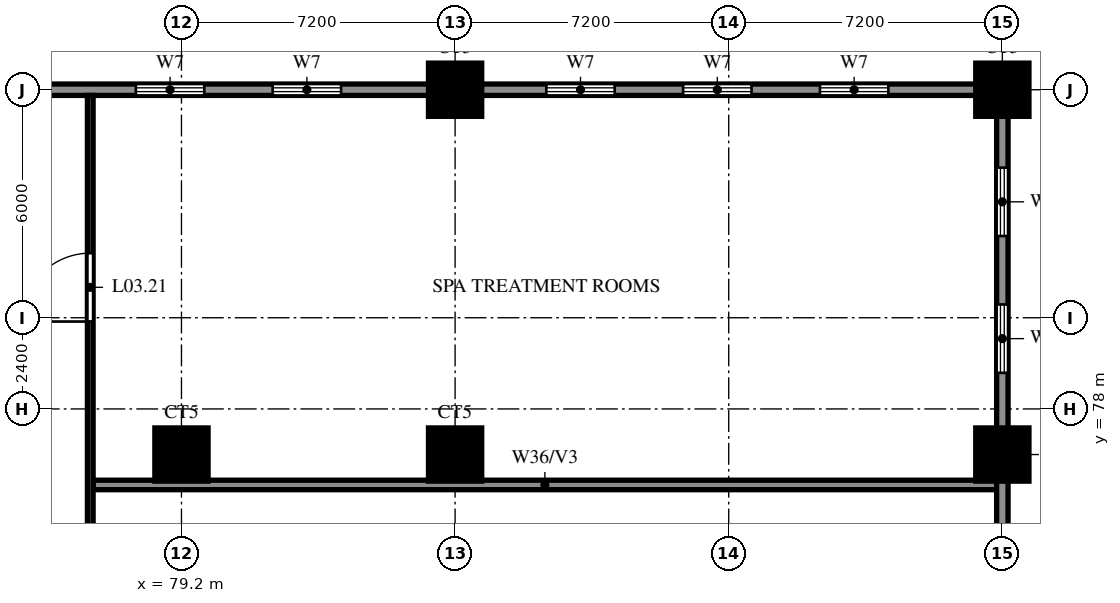
"""IFC4 building model, lengths in metres.
Left out: names, types, materials, properties, quantities, classifications, styles, units other than length and angle.
Written with IfcOpenShell. Run it as: python <this file> out.ifc"""

import sys

from ifc_helpers import new_model, si_unit, direction, frame, frame_2d, origin, origin_2d, place, context, subcontext, project, spatial, rectangle, circle, extrude, source, transform, mapped, element, fill, save


model = new_model("IFC4")
c1 = context("Model", 3, precision=1e-05, world=origin(), true_north=direction((0.0, 1.0)))
c2 = subcontext(c1, "Body", "Model", "MODEL_VIEW")
j1 = project(units=[si_unit("LENGTHUNIT", "METRE"), si_unit("PLANEANGLEUNIT", "RADIAN")], contexts=[c1])
p1 = place(None, origin())
s1 = spatial("IfcSite", under=j1, at=p1, CompositionType="ELEMENT")
p2 = place(p1, origin())
s2 = spatial("IfcBuilding", under=s1, at=p2, CompositionType="ELEMENT")
p3 = place(p2, frame((0.0, 0.0, 17.4)))
s3 = spatial("IfcBuildingStorey", under=s2, at=p3, CompositionType="ELEMENT", Elevation=17.4)
m1 = source(origin(), c2, "Body", "SweptSolid", [
    extrude(circle(Radius=0.7, at=origin_2d()), origin(), (0.0, 0.0, 1.0), 3.8),
])
for number, where, z_axis, x_axis in (
    (1, (79.2, 76.8, 0.0), (0.0, 0.0, 1.0), (1.0, 0.0, 0.0)),
    (2, (86.4, 76.8, 0.0), (0.0, 0.0, 1.0), (1.0, 0.0, 0.0)),
    (3, (100.8, 76.8, 0.0), (0.0, 0.0, 1.0), (1.0, 0.0, 0.0)),
    (4, (86.4, 86.4, 0.0), (0.0, 0.0, 1.0), (1.0, 0.0, 0.0)),
    (5, (100.8, 86.4, 0.0), (0.0, 0.0, 1.0), (1.0, 0.0, 0.0)),
):
    element("IfcColumn", number, at=place(p3, frame(where, z_axis=z_axis, x_axis=x_axis)), inside=s3, PredefinedType="COLUMN", context=c2, shape_type="MappedRepresentation", body=[
        mapped(m1, transform((0.0, 0.0, 0.0))),
    ])
p4 = place(p3, frame((76.875, 76.0, 0.0), z_axis=(0.0, 0.0, 1.0), x_axis=(1.0, 0.0, 0.0)))
e6 = element("IfcWall", 6, at=p4, inside=s3, PredefinedType="SOLIDWALL", context=c2, shape_type="SweptSolid", body=[
    extrude(rectangle(XDim=23.775, YDim=0.25, at=frame_2d((11.887, 0.0))), origin(), (0.0, 0.0, 1.0), 2.6),
])
p5 = place(p3, frame((0.0, 86.4, 0.0), z_axis=(0.0, 0.0, 1.0), x_axis=(1.0, 0.0, 0.0)))
e7 = element("IfcWall", 7, at=p5, inside=s3, PredefinedType="SOLIDWALL", context=c2, shape_type="SweptSolid", body=[
    extrude(rectangle(XDim=100.8, YDim=0.3, at=frame_2d((50.4, 0.0))), origin(), (0.0, 0.0, 1.0), 3.8),
])
p6 = place(p5, frame((2.4, 0.0, 0.6)))
e8 = element("IfcOpeningElement", 8, at=p6, cuts=e7, PredefinedType="OPENING", context=c2, shape_type="SweptSolid", body=[
    extrude(rectangle(XDim=1.8, YDim=2.4, at=frame_2d((0.9, 1.2))), frame((0.0, 0.16, 0.0), z_axis=(0.0, -1.0, 0.0), x_axis=(1.0, 0.0, 0.0)), (0.0, 0.0, 1.0), 0.32),
])
p7 = place(p5, frame((6.0, 0.0, 0.6)))
e9 = element("IfcOpeningElement", 9, at=p7, cuts=e7, PredefinedType="OPENING", context=c2, shape_type="SweptSolid", body=[
    extrude(rectangle(XDim=1.8, YDim=2.4, at=frame_2d((0.9, 1.2))), frame((0.0, 0.16, 0.0), z_axis=(0.0, -1.0, 0.0), x_axis=(1.0, 0.0, 0.0)), (0.0, 0.0, 1.0), 0.32),
])
p8 = place(p5, frame((9.6, 0.0, 0.6)))
e10 = element("IfcOpeningElement", 10, at=p8, cuts=e7, PredefinedType="OPENING", context=c2, shape_type="SweptSolid", body=[
    extrude(rectangle(XDim=1.8, YDim=2.4, at=frame_2d((0.9, 1.2))), frame((0.0, 0.16, 0.0), z_axis=(0.0, -1.0, 0.0), x_axis=(1.0, 0.0, 0.0)), (0.0, 0.0, 1.0), 0.32),
])
p9 = place(p5, frame((16.8, 0.0, 0.6)))
e11 = element("IfcOpeningElement", 11, at=p9, cuts=e7, PredefinedType="OPENING", context=c2, shape_type="SweptSolid", body=[
    extrude(rectangle(XDim=1.8, YDim=2.4, at=frame_2d((0.9, 1.2))), frame((0.0, 0.16, 0.0), z_axis=(0.0, -1.0, 0.0), x_axis=(1.0, 0.0, 0.0)), (0.0, 0.0, 1.0), 0.32),
])
p10 = place(p5, frame((20.4, 0.0, 0.6)))
e12 = element("IfcOpeningElement", 12, at=p10, cuts=e7, PredefinedType="OPENING", context=c2, shape_type="SweptSolid", body=[
    extrude(rectangle(XDim=1.8, YDim=2.4, at=frame_2d((0.9, 1.2))), frame((0.0, 0.16, 0.0), z_axis=(0.0, -1.0, 0.0), x_axis=(1.0, 0.0, 0.0)), (0.0, 0.0, 1.0), 0.32),
])
p11 = place(p5, frame((78.0, 0.0, 0.6)))
e13 = element("IfcOpeningElement", 13, at=p11, cuts=e7, PredefinedType="OPENING", context=c2, shape_type="SweptSolid", body=[
    extrude(rectangle(XDim=1.8, YDim=2.4, at=frame_2d((0.9, 1.2))), frame((0.0, 0.16, 0.0), z_axis=(0.0, -1.0, 0.0), x_axis=(1.0, 0.0, 0.0)), (0.0, 0.0, 1.0), 0.32),
])
p12 = place(p5, frame((81.6, 0.0, 0.6)))
e14 = element("IfcOpeningElement", 14, at=p12, cuts=e7, PredefinedType="OPENING", context=c2, shape_type="SweptSolid", body=[
    extrude(rectangle(XDim=1.8, YDim=2.4, at=frame_2d((0.9, 1.2))), frame((0.0, 0.16, 0.0), z_axis=(0.0, -1.0, 0.0), x_axis=(1.0, 0.0, 0.0)), (0.0, 0.0, 1.0), 0.32),
])
p13 = place(p5, frame((88.8, 0.0, 0.6)))
e15 = element("IfcOpeningElement", 15, at=p13, cuts=e7, PredefinedType="OPENING", context=c2, shape_type="SweptSolid", body=[
    extrude(rectangle(XDim=1.8, YDim=2.4, at=frame_2d((0.9, 1.2))), frame((0.0, 0.16, 0.0), z_axis=(0.0, -1.0, 0.0), x_axis=(1.0, 0.0, 0.0)), (0.0, 0.0, 1.0), 0.32),
])
p14 = place(p5, frame((92.4, 0.0, 0.6)))
e16 = element("IfcOpeningElement", 16, at=p14, cuts=e7, PredefinedType="OPENING", context=c2, shape_type="SweptSolid", body=[
    extrude(rectangle(XDim=1.8, YDim=2.4, at=frame_2d((0.9, 1.2))), frame((0.0, 0.16, 0.0), z_axis=(0.0, -1.0, 0.0), x_axis=(1.0, 0.0, 0.0)), (0.0, 0.0, 1.0), 0.32),
])
p15 = place(p5, frame((96.0, 0.0, 0.6)))
e17 = element("IfcOpeningElement", 17, at=p15, cuts=e7, PredefinedType="OPENING", context=c2, shape_type="SweptSolid", body=[
    extrude(rectangle(XDim=1.8, YDim=2.4, at=frame_2d((0.9, 1.2))), frame((0.0, 0.16, 0.0), z_axis=(0.0, -1.0, 0.0), x_axis=(1.0, 0.0, 0.0)), (0.0, 0.0, 1.0), 0.32),
])
p16 = place(p3, frame((76.8, 54.3, 0.0), z_axis=(0.0, 0.0, 1.0), x_axis=(0.0, 1.0, 0.0)))
e18 = element("IfcWall", 18, at=p16, inside=s3, PredefinedType="PARTITIONING", context=c2, shape_type="SweptSolid", body=[
    extrude(rectangle(XDim=31.95, YDim=0.15, at=frame_2d((15.975, 0.0))), origin(), (0.0, 0.0, 1.0), 2.6),
])
p17 = place(p16, frame((10.65, 0.0, 0.0)))
e19 = element("IfcOpeningElement", 19, at=p17, cuts=e18, PredefinedType="OPENING", context=c2, shape_type="SweptSolid", body=[
    extrude(rectangle(XDim=1.8, YDim=2.1, at=frame_2d((0.9, 1.05))), frame((0.0, 0.085, 0.0), z_axis=(0.0, -1.0, 0.0), x_axis=(1.0, 0.0, 0.0)), (0.0, 0.0, 1.0), 0.17),
])
p18 = place(p16, frame((18.25, 0.0, 0.0)))
e20 = element("IfcOpeningElement", 20, at=p18, cuts=e18, PredefinedType="OPENING", context=c2, shape_type="SweptSolid", body=[
    extrude(rectangle(XDim=1.1, YDim=2.1, at=frame_2d((0.55, 1.05))), frame((0.0, 0.085, 0.0), z_axis=(0.0, -1.0, 0.0), x_axis=(1.0, 0.0, 0.0)), (0.0, 0.0, 1.0), 0.17),
])
p19 = place(p16, frame((26.0, 0.0, 0.0)))
e21 = element("IfcOpeningElement", 21, at=p19, cuts=e18, PredefinedType="OPENING", context=c2, shape_type="SweptSolid", body=[
    extrude(rectangle(XDim=1.8, YDim=2.1, at=frame_2d((0.9, 1.05))), frame((0.0, 0.085, 0.0), z_axis=(0.0, -1.0, 0.0), x_axis=(1.0, 0.0, 0.0)), (0.0, 0.0, 1.0), 0.17),
])
p20 = place(p3, frame((100.8, 63.1, 0.0), z_axis=(0.0, 0.0, 1.0), x_axis=(0.0, 1.0, 0.0)))
e22 = element("IfcWall", 22, at=p20, inside=s3, PredefinedType="SOLIDWALL", context=c2, shape_type="SweptSolid", body=[
    extrude(rectangle(XDim=23.3, YDim=0.3, at=frame_2d((11.65, 0.0))), origin(), (0.0, 0.0, 1.0), 3.8),
])
p21 = place(p20, frame((1.45, 0.0, 0.6)))
e23 = element("IfcOpeningElement", 23, at=p21, cuts=e22, PredefinedType="OPENING", context=c2, shape_type="SweptSolid", body=[
    extrude(rectangle(XDim=1.8, YDim=2.4, at=frame_2d((0.9, 1.2))), frame((0.0, 0.16, 0.0), z_axis=(0.0, -1.0, 0.0), x_axis=(1.0, 0.0, 0.0)), (0.0, 0.0, 1.0), 0.32),
])
p22 = place(p20, frame((3.55, 0.0, 0.6)))
e24 = element("IfcOpeningElement", 24, at=p22, cuts=e22, PredefinedType="OPENING", context=c2, shape_type="SweptSolid", body=[
    extrude(rectangle(XDim=1.8, YDim=2.4, at=frame_2d((0.9, 1.2))), frame((0.0, 0.16, 0.0), z_axis=(0.0, -1.0, 0.0), x_axis=(1.0, 0.0, 0.0)), (0.0, 0.0, 1.0), 0.32),
])
p23 = place(p20, frame((8.65, 0.0, 0.6)))
e25 = element("IfcOpeningElement", 25, at=p23, cuts=e22, PredefinedType="OPENING", context=c2, shape_type="SweptSolid", body=[
    extrude(rectangle(XDim=1.8, YDim=2.4, at=frame_2d((0.9, 1.2))), frame((0.0, 0.16, 0.0), z_axis=(0.0, -1.0, 0.0), x_axis=(1.0, 0.0, 0.0)), (0.0, 0.0, 1.0), 0.32),
])
p24 = place(p20, frame((15.85, 0.0, 0.6)))
e26 = element("IfcOpeningElement", 26, at=p24, cuts=e22, PredefinedType="OPENING", context=c2, shape_type="SweptSolid", body=[
    extrude(rectangle(XDim=1.8, YDim=2.4, at=frame_2d((0.9, 1.2))), frame((0.0, 0.16, 0.0), z_axis=(0.0, -1.0, 0.0), x_axis=(1.0, 0.0, 0.0)), (0.0, 0.0, 1.0), 0.32),
])
p25 = place(p20, frame((19.45, 0.0, 0.6)))
e27 = element("IfcOpeningElement", 27, at=p25, cuts=e22, PredefinedType="OPENING", context=c2, shape_type="SweptSolid", body=[
    extrude(rectangle(XDim=1.8, YDim=2.4, at=frame_2d((0.9, 1.2))), frame((0.0, 0.16, 0.0), z_axis=(0.0, -1.0, 0.0), x_axis=(1.0, 0.0, 0.0)), (0.0, 0.0, 1.0), 0.32),
])
p26 = place(p19, origin())
e28 = element("IfcDoor", 28, at=p26, inside=s3, OperationType="DOUBLE_DOOR_SINGLE_SWING", PredefinedType="DOOR", context=c2, shape_type="SweptSolid", body=[
    extrude(rectangle(XDim=1.8, YDim=2.1, at=frame_2d((0.9, 1.05))), frame((0.0, 0.025, 0.0), z_axis=(0.0, -1.0, 0.0), x_axis=(1.0, 0.0, 0.0)), (0.0, 0.0, 1.0), 0.05),
])
fill(e21, e28)
p27 = place(p11, origin())
e29 = element("IfcWindow", 29, at=p27, inside=s3, PartitioningType="DOUBLE_PANEL_VERTICAL", PredefinedType="WINDOW", context=c2, shape_type="SweptSolid", body=[
    extrude(rectangle(XDim=1.8, YDim=2.4, at=frame_2d((0.9, 1.2))), frame((0.0, 0.03, 0.0), z_axis=(0.0, -1.0, 0.0), x_axis=(1.0, 0.0, 0.0)), (0.0, 0.0, 1.0), 0.06),
])
fill(e13, e29)
p28 = place(p12, origin())
e30 = element("IfcWindow", 30, at=p28, inside=s3, PartitioningType="DOUBLE_PANEL_VERTICAL", PredefinedType="WINDOW", context=c2, shape_type="SweptSolid", body=[
    extrude(rectangle(XDim=1.8, YDim=2.4, at=frame_2d((0.9, 1.2))), frame((0.0, 0.03, 0.0), z_axis=(0.0, -1.0, 0.0), x_axis=(1.0, 0.0, 0.0)), (0.0, 0.0, 1.0), 0.06),
])
fill(e14, e30)
p29 = place(p13, origin())
e31 = element("IfcWindow", 31, at=p29, inside=s3, PartitioningType="DOUBLE_PANEL_VERTICAL", PredefinedType="WINDOW", context=c2, shape_type="SweptSolid", body=[
    extrude(rectangle(XDim=1.8, YDim=2.4, at=frame_2d((0.9, 1.2))), frame((0.0, 0.03, 0.0), z_axis=(0.0, -1.0, 0.0), x_axis=(1.0, 0.0, 0.0)), (0.0, 0.0, 1.0), 0.06),
])
fill(e15, e31)
p30 = place(p14, origin())
e32 = element("IfcWindow", 32, at=p30, inside=s3, PartitioningType="DOUBLE_PANEL_VERTICAL", PredefinedType="WINDOW", context=c2, shape_type="SweptSolid", body=[
    extrude(rectangle(XDim=1.8, YDim=2.4, at=frame_2d((0.9, 1.2))), frame((0.0, 0.03, 0.0), z_axis=(0.0, -1.0, 0.0), x_axis=(1.0, 0.0, 0.0)), (0.0, 0.0, 1.0), 0.06),
])
fill(e16, e32)
p31 = place(p15, origin())
e33 = element("IfcWindow", 33, at=p31, inside=s3, PartitioningType="DOUBLE_PANEL_VERTICAL", PredefinedType="WINDOW", context=c2, shape_type="SweptSolid", body=[
    extrude(rectangle(XDim=1.8, YDim=2.4, at=frame_2d((0.9, 1.2))), frame((0.0, 0.03, 0.0), z_axis=(0.0, -1.0, 0.0), x_axis=(1.0, 0.0, 0.0)), (0.0, 0.0, 1.0), 0.06),
])
fill(e17, e33)
p32 = place(p24, origin())
e34 = element("IfcWindow", 34, at=p32, inside=s3, PartitioningType="DOUBLE_PANEL_VERTICAL", PredefinedType="WINDOW", context=c2, shape_type="SweptSolid", body=[
    extrude(rectangle(XDim=1.8, YDim=2.4, at=frame_2d((0.9, 1.2))), frame((0.0, 0.03, 0.0), z_axis=(0.0, -1.0, 0.0), x_axis=(1.0, 0.0, 0.0)), (0.0, 0.0, 1.0), 0.06),
])
fill(e26, e34)
p33 = place(p25, origin())
e35 = element("IfcWindow", 35, at=p33, inside=s3, PartitioningType="DOUBLE_PANEL_VERTICAL", PredefinedType="WINDOW", context=c2, shape_type="SweptSolid", body=[
    extrude(rectangle(XDim=1.8, YDim=2.4, at=frame_2d((0.9, 1.2))), frame((0.0, 0.03, 0.0), z_axis=(0.0, -1.0, 0.0), x_axis=(1.0, 0.0, 0.0)), (0.0, 0.0, 1.0), 0.06),
])
fill(e27, e35)
save(model, sys.argv[1])
